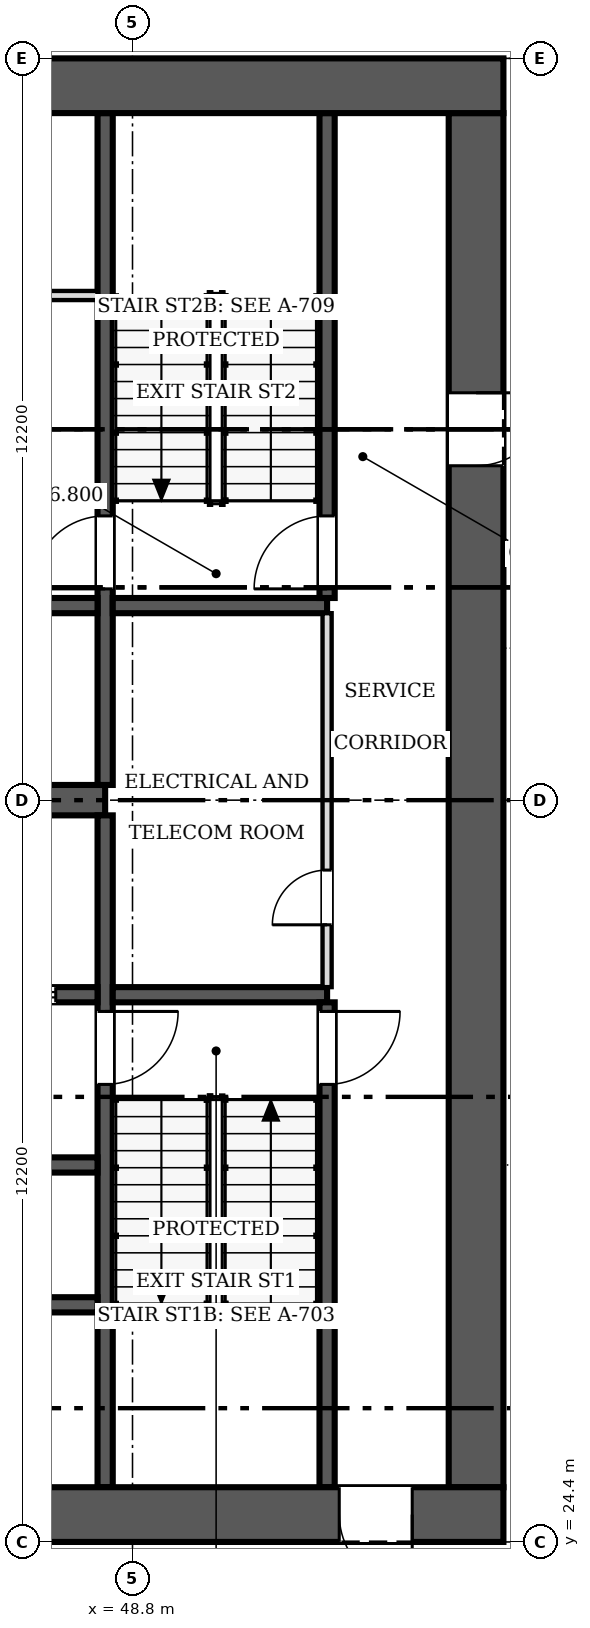
"""IFC4 building model, lengths in metres.
Left out: names, types, materials, properties, quantities, classifications, styles, units other than length and angle.
Written with IfcOpenShell. Run it as: python <this file> out.ifc"""

import sys

from ifc_helpers import new_model, si_unit, direction, frame, frame_2d, origin, place, context, subcontext, project, spatial, rectangle, extrude, source, transform, mapped, element, fill, save


model = new_model("IFC4")
c1 = context("Model", 3, precision=1e-05, world=origin(), true_north=direction((0.0, 1.0)))
c2 = subcontext(c1, "Body", "Model", "MODEL_VIEW")
j1 = project(units=[si_unit("LENGTHUNIT", "METRE"), si_unit("PLANEANGLEUNIT", "RADIAN")], contexts=[c1])
p1 = place(None, origin())
s1 = spatial("IfcSite", under=j1, at=p1, CompositionType="ELEMENT")
p2 = place(p1, origin())
s2 = spatial("IfcBuilding", under=s1, at=p2, CompositionType="ELEMENT")
p3 = place(p2, frame((0.0, 0.0, 16.8)))
s3 = spatial("IfcBuildingStorey", under=s2, at=p3, CompositionType="ELEMENT", Elevation=16.8)
p4 = place(p3, frame((54.9, 24.85, 0.0), z_axis=(0.0, 0.0, 1.0), x_axis=(-1.0, 0.0, 0.0)))
e1 = element("IfcWall", 1, at=p4, inside=s3, PredefinedType="SHEAR", context=c2, shape_type="SweptSolid", body=[
    extrude(rectangle(XDim=24.4, YDim=0.9, at=frame_2d((12.2, 0.0))), origin(), (0.0, 0.0, 1.0), 4.5),
])
m1 = source(origin(), c2, "Body", "SweptSolid", [
    extrude(rectangle(XDim=1.2, YDim=2.1, at=frame_2d((0.6, 1.05))), frame((0.0, 0.46, 0.0), z_axis=(0.0, -1.0, 0.0), x_axis=(1.0, 0.0, 0.0)), (0.0, 0.0, 1.0), 0.92),
])
p5 = place(p4, frame((1.5, 0.0, 0.0)))
e2 = element("IfcOpeningElement", 2, at=p5, cuts=e1, PredefinedType="OPENING", context=c2, shape_type="MappedRepresentation", body=[
    mapped(m1, transform((0.0, 0.0, 0.0), scale=1.0)),
])
p6 = place(p3, frame((30.5, 48.35, 0.0), z_axis=(0.0, 0.0, 1.0), x_axis=(1.0, 0.0, 0.0)))
e3 = element("IfcWall", 3, at=p6, inside=s3, PredefinedType="SHEAR", context=c2, shape_type="SweptSolid", body=[
    extrude(rectangle(XDim=24.4, YDim=0.9, at=frame_2d((12.2, 0.0))), origin(), (0.0, 0.0, 1.0), 4.5),
])
p7 = place(p3, frame((54.45, 47.9, 0.0), z_axis=(0.0, 0.0, 1.0), x_axis=(0.0, -1.0, 0.0)))
e4 = element("IfcWall", 4, at=p7, inside=s3, PredefinedType="SHEAR", context=c2, shape_type="SweptSolid", body=[
    extrude(rectangle(XDim=22.6, YDim=0.9, at=frame_2d((11.3, 0.0))), origin(), (0.0, 0.0, 1.0), 4.5),
])
p8 = place(p7, frame((4.6, 0.0, 0.0)))
e5 = element("IfcOpeningElement", 5, at=p8, cuts=e4, PredefinedType="OPENING", context=c2, shape_type="MappedRepresentation", body=[
    mapped(m1, transform((0.0, 0.0, 0.0), scale=1.0)),
])
p9 = place(p3, frame((31.4, 36.6, 0.0), z_axis=(0.0, 0.0, 1.0), x_axis=(1.0, 0.0, 0.0)))
e6 = element("IfcWall", 6, at=p9, inside=s3, PredefinedType="SHEAR", context=c2, shape_type="SweptSolid", body=[
    extrude(rectangle(XDim=16.95, YDim=0.5, at=frame_2d((8.475, 0.0))), origin(), (0.0, 0.0, 1.0), 4.5),
])
p10 = place(p3, frame((48.35, 36.35, 0.0), z_axis=(0.0, 0.0, 1.0), x_axis=(0.0, -1.0, 0.0)))
e7 = element("IfcWall", 7, at=p10, inside=s3, PredefinedType="SOLIDWALL", context=c2, shape_type="SweptSolid", body=[
    extrude(rectangle(XDim=11.05, YDim=0.25, at=frame_2d((5.525, 0.0))), origin(), (0.0, 0.0, 1.0), 4.5),
])
m2 = source(origin(), c2, "Body", "SweptSolid", [
    extrude(rectangle(XDim=1.2, YDim=2.1, at=frame_2d((0.6, 1.05))), frame((0.0, 0.135, 0.0), z_axis=(0.0, -1.0, 0.0), x_axis=(1.0, 0.0, 0.0)), (0.0, 0.0, 1.0), 0.27),
])
p11 = place(p10, frame((3.225, 0.0, 0.0)))
e8 = element("IfcOpeningElement", 8, at=p11, cuts=e7, PredefinedType="OPENING", context=c2, shape_type="MappedRepresentation", body=[
    mapped(m2, transform((0.0, 0.0, 0.0), scale=1.0)),
])
p12 = place(p3, frame((48.35, 47.9, 0.0), z_axis=(0.0, 0.0, 1.0), x_axis=(0.0, -1.0, 0.0)))
e9 = element("IfcWall", 9, at=p12, inside=s3, PredefinedType="SOLIDWALL", context=c2, shape_type="SweptSolid", body=[
    extrude(rectangle(XDim=11.05, YDim=0.25, at=frame_2d((5.525, 0.0))), origin(), (0.0, 0.0, 1.0), 4.5),
])
p13 = place(p12, frame((6.625, 0.0, 0.0)))
e10 = element("IfcOpeningElement", 10, at=p13, cuts=e9, PredefinedType="OPENING", context=c2, shape_type="MappedRepresentation", body=[
    mapped(m2, transform((0.0, 0.0, 0.0), scale=1.0)),
])
p14 = place(p3, frame((48.225, 33.4, 0.0), z_axis=(0.0, 0.0, 1.0), x_axis=(-1.0, 0.0, 0.0)))
e11 = element("IfcWall", 11, at=p14, inside=s3, PredefinedType="SOLIDWALL", context=c2, shape_type="SweptSolid", body=[
    extrude(rectangle(XDim=5.275, YDim=0.25, at=frame_2d((2.638, 0.0))), origin(), (0.0, 0.0, 1.0), 4.5),
])
p15 = place(p14, frame((3.512, 0.0, 0.0)))
e12 = element("IfcOpeningElement", 12, at=p15, cuts=e11, PredefinedType="OPENING", context=c2, shape_type="MappedRepresentation", body=[
    mapped(m2, transform((0.0, 0.0, 0.0), scale=1.0)),
])
p16 = place(p14, frame((0.688, 0.0, 0.0)))
e13 = element("IfcOpeningElement", 13, at=p16, cuts=e11, PredefinedType="OPENING", context=c2, shape_type="MappedRepresentation", body=[
    mapped(m2, transform((0.0, 0.0, 0.0), scale=1.0)),
])
p17 = place(p3, frame((48.475, 33.4, 0.0), z_axis=(0.0, 0.0, 1.0), x_axis=(1.0, 0.0, 0.0)))
e14 = element("IfcWall", 14, at=p17, inside=s3, PredefinedType="SOLIDWALL", context=c2, shape_type="SweptSolid", body=[
    extrude(rectangle(XDim=3.525, YDim=0.25, at=frame_2d((1.762, 0.0))), origin(), (0.0, 0.0, 1.0), 4.5),
])
for number, where, z_axis, x_axis in (
    (15, (42.95, 28.3, 0.0), (0.0, 0.0, 1.0), (1.0, 0.0, 0.0)),
    (16, (42.95, 39.8, 0.0), (0.0, 0.0, 1.0), (1.0, 0.0, 0.0)),
):
    element("IfcWall", number, at=place(p3, frame(where, z_axis=z_axis, x_axis=x_axis)), inside=s3, PredefinedType="SOLIDWALL", context=c2, shape_type="SweptSolid", body=[
        extrude(rectangle(XDim=5.275, YDim=0.25, at=frame_2d((2.638, 0.0))), origin(), (0.0, 0.0, 1.0), 4.5),
    ])
p18 = place(p3, frame((48.475, 39.8, 0.0), z_axis=(0.0, 0.0, 1.0), x_axis=(1.0, 0.0, 0.0)))
e17 = element("IfcWall", 17, at=p18, inside=s3, PredefinedType="SOLIDWALL", context=c2, shape_type="SweptSolid", body=[
    extrude(rectangle(XDim=3.525, YDim=0.25, at=frame_2d((1.762, 0.0))), origin(), (0.0, 0.0, 1.0), 4.5),
])
p19 = place(p3, frame((52.0, 25.3, 0.0), z_axis=(0.0, 0.0, 1.0), x_axis=(0.0, 1.0, 0.0)))
e18 = element("IfcWall", 18, at=p19, inside=s3, PredefinedType="SOLIDWALL", context=c2, shape_type="SweptSolid", body=[
    extrude(rectangle(XDim=7.975, YDim=0.25, at=frame_2d((3.987, 0.0))), origin(), (0.0, 0.0, 1.0), 4.5),
])
p20 = place(p19, frame((6.625, 0.0, 0.0)))
e19 = element("IfcOpeningElement", 19, at=p20, cuts=e18, PredefinedType="OPENING", context=c2, shape_type="MappedRepresentation", body=[
    mapped(m2, transform((0.0, 0.0, 0.0), scale=1.0)),
])
p21 = place(p3, frame((52.0, 39.925, 0.0), z_axis=(0.0, 0.0, 1.0), x_axis=(0.0, 1.0, 0.0)))
e20 = element("IfcWall", 20, at=p21, inside=s3, PredefinedType="SOLIDWALL", context=c2, shape_type="SweptSolid", body=[
    extrude(rectangle(XDim=7.975, YDim=0.25, at=frame_2d((3.987, 0.0))), origin(), (0.0, 0.0, 1.0), 4.5),
])
p22 = place(p21, frame((0.15, 0.0, 0.0)))
e21 = element("IfcOpeningElement", 21, at=p22, cuts=e20, PredefinedType="OPENING", context=c2, shape_type="MappedRepresentation", body=[
    mapped(m2, transform((0.0, 0.0, 0.0), scale=1.0)),
])
p23 = place(p3, frame((42.95, 30.6, 0.0), z_axis=(0.0, 0.0, 1.0), x_axis=(1.0, 0.0, 0.0)))
e22 = element("IfcWall", 22, at=p23, inside=s3, PredefinedType="SOLIDWALL", context=c2, shape_type="SweptSolid", body=[
    extrude(rectangle(XDim=5.275, YDim=0.25, at=frame_2d((2.638, 0.0))), origin(), (0.0, 0.0, 1.0), 4.5),
])
p24 = place(p3, frame((52.0, 33.525, 0.0), z_axis=(0.0, 0.0, 1.0), x_axis=(0.0, 1.0, 0.0)))
e23 = element("IfcWall", 23, at=p24, inside=s3, PredefinedType="PARTITIONING", context=c2, shape_type="SweptSolid", body=[
    extrude(rectangle(XDim=6.15, YDim=0.15, at=frame_2d((3.075, 0.0))), origin(), (0.0, 0.0, 1.0), 4.3),
])
m3 = source(origin(), c2, "Body", "SweptSolid", [
    extrude(rectangle(XDim=0.9, YDim=2.1, at=frame_2d((0.45, 1.05))), frame((0.0, 0.085, 0.0), z_axis=(0.0, -1.0, 0.0), x_axis=(1.0, 0.0, 0.0)), (0.0, 0.0, 1.0), 0.17),
])
p25 = place(p24, frame((1.025, 0.0, 0.0)))
e24 = element("IfcOpeningElement", 24, at=p25, cuts=e23, PredefinedType="OPENING", context=c2, shape_type="MappedRepresentation", body=[
    mapped(m3, transform((0.0, 0.0, 0.0), scale=1.0)),
])
p26 = place(p3, frame((45.65, 44.9, 0.0), z_axis=(0.0, 0.0, 1.0), x_axis=(1.0, 0.0, 0.0)))
e25 = element("IfcWall", 25, at=p26, inside=s3, PredefinedType="PARTITIONING", context=c2, shape_type="SweptSolid", body=[
    extrude(rectangle(XDim=2.575, YDim=0.15, at=frame_2d((1.288, 0.0))), origin(), (0.0, 0.0, 1.0), 4.3),
])
p27 = place(p26, frame((0.8, 0.0, 0.0)))
e26 = element("IfcOpeningElement", 26, at=p27, cuts=e25, PredefinedType="OPENING", context=c2, shape_type="MappedRepresentation", body=[
    mapped(m3, transform((0.0, 0.0, 0.0), scale=1.0)),
])
m4 = source(origin(), c2, "Body", "SweptSolid", [
    extrude(rectangle(XDim=1.2, YDim=2.1, at=frame_2d((0.6, 1.05))), frame((0.0, 0.025, 0.0), z_axis=(0.0, -1.0, 0.0), x_axis=(1.0, 0.0, 0.0)), (0.0, 0.0, 1.0), 0.05),
])
p28 = place(p5, origin())
e27 = element("IfcDoor", 27, at=p28, inside=s3, OperationType="SINGLE_SWING_LEFT", PredefinedType="DOOR", context=c2, shape_type="MappedRepresentation", body=[
    mapped(m4, transform((0.0, 0.0, 0.0), scale=1.0)),
])
fill(e2, e27)
p29 = place(p8, origin())
e28 = element("IfcDoor", 28, at=p29, inside=s3, OperationType="SINGLE_SWING_LEFT", PredefinedType="DOOR", context=c2, shape_type="MappedRepresentation", body=[
    mapped(m4, transform((0.0, 0.0, 0.0), scale=1.0)),
])
fill(e5, e28)
p30 = place(p11, origin())
e29 = element("IfcDoor", 29, at=p30, inside=s3, OperationType="SINGLE_SWING_LEFT", PredefinedType="DOOR", context=c2, shape_type="MappedRepresentation", body=[
    mapped(m4, transform((0.0, 0.0, 0.0), scale=1.0)),
])
fill(e8, e29)
p31 = place(p13, origin())
e30 = element("IfcDoor", 30, at=p31, inside=s3, OperationType="SINGLE_SWING_RIGHT", PredefinedType="DOOR", context=c2, shape_type="MappedRepresentation", body=[
    mapped(m4, transform((0.0, 0.0, 0.0), scale=1.0)),
])
fill(e10, e30)
p32 = place(p16, origin())
e31 = element("IfcDoor", 31, at=p32, inside=s3, OperationType="DOUBLE_DOOR_SLIDING", PredefinedType="DOOR", context=c2, shape_type="MappedRepresentation", body=[
    mapped(m4, transform((0.0, 0.0, 0.0), scale=1.0)),
])
fill(e13, e31)
p33 = place(p20, origin())
e32 = element("IfcDoor", 32, at=p33, inside=s3, OperationType="SINGLE_SWING_RIGHT", PredefinedType="DOOR", context=c2, shape_type="MappedRepresentation", body=[
    mapped(m4, transform((0.0, 0.0, 0.0), scale=1.0)),
])
fill(e19, e32)
p34 = place(p22, origin())
e33 = element("IfcDoor", 33, at=p34, inside=s3, OperationType="SINGLE_SWING_LEFT", PredefinedType="DOOR", context=c2, shape_type="MappedRepresentation", body=[
    mapped(m4, transform((0.0, 0.0, 0.0), scale=1.0)),
])
fill(e21, e33)
m5 = source(origin(), c2, "Body", "SweptSolid", [
    extrude(rectangle(XDim=0.9, YDim=2.1, at=frame_2d((0.45, 1.05))), frame((0.0, 0.025, 0.0), z_axis=(0.0, -1.0, 0.0), x_axis=(1.0, 0.0, 0.0)), (0.0, 0.0, 1.0), 0.05),
])
p35 = place(p25, origin())
e34 = element("IfcDoor", 34, at=p35, inside=s3, OperationType="SINGLE_SWING_LEFT", PredefinedType="DOOR", context=c2, shape_type="MappedRepresentation", body=[
    mapped(m5, transform((0.0, 0.0, 0.0), scale=1.0)),
])
fill(e24, e34)
save(model, sys.argv[1])
